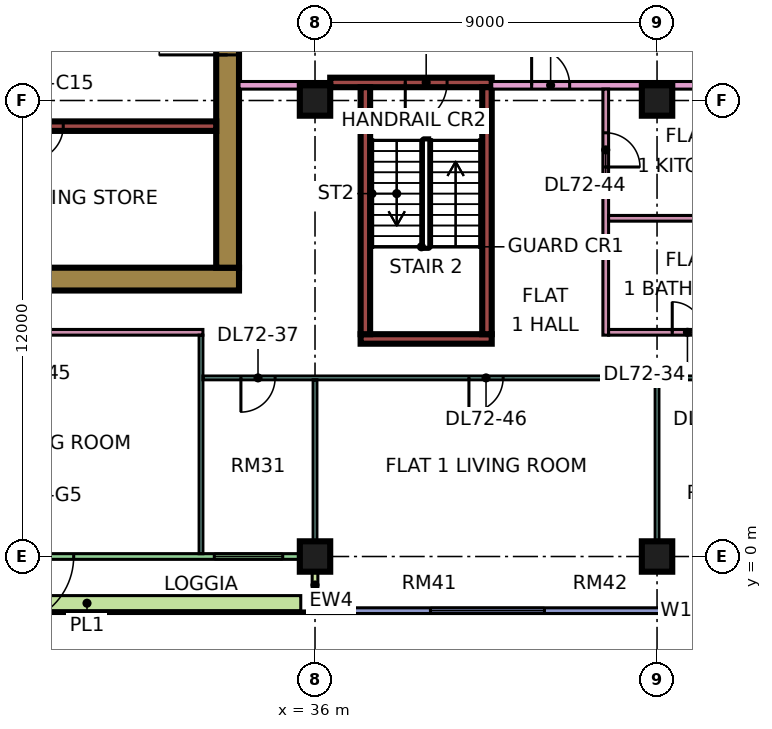
"""IFC4 building model, lengths in metres.
Left out: names, types, materials, properties, quantities, classifications, styles, units other than length and angle.
Written with IfcOpenShell. Run it as: python <this file> out.ifc"""

import sys

from ifc_helpers import new_model, si_unit, direction, frame, frame_2d, origin, origin_2d, place, context, subcontext, project, spatial, rectangle, extrude, element, fill, save


model = new_model("IFC4")
c1 = context("Model", 3, precision=1e-05, world=origin(), true_north=direction((0.0, 1.0)))
c2 = subcontext(c1, "Body", "Model", "MODEL_VIEW")
j1 = project(units=[si_unit("LENGTHUNIT", "METRE"), si_unit("PLANEANGLEUNIT", "RADIAN")], contexts=[c1])
p1 = place(None, origin())
s1 = spatial("IfcSite", under=j1, at=p1, CompositionType="ELEMENT")
p2 = place(p1, origin())
s2 = spatial("IfcBuilding", under=s1, at=p2, CompositionType="ELEMENT")
p3 = place(p2, frame((0.0, 0.0, 307.15)))
s3 = spatial("IfcBuildingStorey", under=s2, at=p3, CompositionType="ELEMENT", Elevation=307.15)
for number, where, z_axis, x_axis in (
    (1, (36.0, 0.0, 0.0), (0.0, 0.0, 1.0), (1.0, 0.0, 0.0)),
    (2, (36.0, 12.0, 0.0), (0.0, 0.0, 1.0), (1.0, 0.0, 0.0)),
    (3, (45.0, 0.0, 0.0), (0.0, 0.0, 1.0), (1.0, 0.0, 0.0)),
    (4, (45.0, 12.0, 0.0), (0.0, 0.0, 1.0), (1.0, 0.0, 0.0)),
):
    element("IfcColumn", number, at=place(p3, frame(where, z_axis=z_axis, x_axis=x_axis)), inside=s3, PredefinedType="COLUMN", context=c2, shape_type="SweptSolid", body=[
        extrude(rectangle(XDim=0.8, YDim=0.8, at=origin_2d()), origin(), (0.0, 0.0, 1.0), 3.75),
    ])
p4 = place(p3, frame((9.0, 7.3, 0.0), z_axis=(0.0, 0.0, 1.0), x_axis=(1.0, 0.0, 0.0)))
e5 = element("IfcWall", 5, at=p4, inside=s3, PredefinedType="SHEAR", context=c2, shape_type="SweptSolid", body=[
    extrude(rectangle(XDim=25.0, YDim=0.6, at=frame_2d((12.5, 0.0))), origin(), (0.0, 0.0, 1.0), 3.75),
])
p5 = place(p3, frame((33.7, 7.6, 0.0), z_axis=(0.0, 0.0, 1.0), x_axis=(0.0, 1.0, 0.0)))
e6 = element("IfcWall", 6, at=p5, inside=s3, PredefinedType="SHEAR", context=c2, shape_type="SweptSolid", body=[
    extrude(rectangle(XDim=11.8, YDim=0.6, at=frame_2d((5.9, 0.0))), origin(), (0.0, 0.0, 1.0), 3.75),
])
p6 = place(p5, frame((5.6, 0.0, 0.0)))
e7 = element("IfcOpeningElement", 7, at=p6, cuts=e6, PredefinedType="OPENING", context=c2, shape_type="SweptSolid", body=[
    extrude(rectangle(XDim=1.8, YDim=2.4, at=frame_2d((0.9, 1.2))), frame((0.0, 0.31, 0.0), z_axis=(0.0, -1.0, 0.0), x_axis=(1.0, 0.0, 0.0)), (0.0, 0.0, 1.0), 0.62),
])
p7 = place(p3, frame((13.45, 11.325, 0.0), z_axis=(0.0, 0.0, 1.0), x_axis=(1.0, 0.0, 0.0)))
e8 = element("IfcWall", 8, at=p7, inside=s3, PredefinedType="SHEAR", context=c2, shape_type="SweptSolid", body=[
    extrude(rectangle(XDim=19.95, YDim=0.25, at=frame_2d((9.975, 0.0))), origin(), (0.0, 0.0, 1.0), 3.75),
])
p8 = place(p7, frame((1.55, 0.0, 0.0)))
e9 = element("IfcOpeningElement", 9, at=p8, cuts=e8, PredefinedType="OPENING", context=c2, shape_type="SweptSolid", body=[
    extrude(rectangle(XDim=0.9, YDim=2.1, at=frame_2d((0.45, 1.05))), frame((0.0, 0.135, 0.0), z_axis=(0.0, -1.0, 0.0), x_axis=(1.0, 0.0, 0.0)), (0.0, 0.0, 1.0), 0.27),
])
p9 = place(p7, frame((5.05, 0.0, 0.0)))
e10 = element("IfcOpeningElement", 10, at=p9, cuts=e8, PredefinedType="OPENING", context=c2, shape_type="SweptSolid", body=[
    extrude(rectangle(XDim=0.9, YDim=2.1, at=frame_2d((0.45, 1.05))), frame((0.0, 0.135, 0.0), z_axis=(0.0, -1.0, 0.0), x_axis=(1.0, 0.0, 0.0)), (0.0, 0.0, 1.0), 0.27),
])
p10 = place(p7, frame((8.425, 0.0, 0.0)))
e11 = element("IfcOpeningElement", 11, at=p10, cuts=e8, PredefinedType="OPENING", context=c2, shape_type="SweptSolid", body=[
    extrude(rectangle(XDim=0.9, YDim=2.1, at=frame_2d((0.45, 1.05))), frame((0.0, 0.135, 0.0), z_axis=(0.0, -1.0, 0.0), x_axis=(1.0, 0.0, 0.0)), (0.0, 0.0, 1.0), 0.27),
])
p11 = place(p7, frame((15.025, 0.0, 0.0)))
e12 = element("IfcOpeningElement", 12, at=p11, cuts=e8, PredefinedType="OPENING", context=c2, shape_type="SweptSolid", body=[
    extrude(rectangle(XDim=0.9, YDim=2.1, at=frame_2d((0.45, 1.05))), frame((0.0, 0.135, 0.0), z_axis=(0.0, -1.0, 0.0), x_axis=(1.0, 0.0, 0.0)), (0.0, 0.0, 1.0), 0.27),
])
p12 = place(p3, frame((37.2, 5.725, 0.0), z_axis=(0.0, 0.0, 1.0), x_axis=(1.0, 0.0, 0.0)))
e13 = element("IfcWall", 13, at=p12, inside=s3, PredefinedType="SHEAR", context=c2, shape_type="SweptSolid", body=[
    extrude(rectangle(XDim=3.45, YDim=0.25, at=frame_2d((1.725, 0.0))), origin(), (0.0, 0.0, 1.0), 3.75),
])
p13 = place(p3, frame((36.4, 12.475, 0.0), z_axis=(0.0, 0.0, 1.0), x_axis=(1.0, 0.0, 0.0)))
e14 = element("IfcWall", 14, at=p13, inside=s3, PredefinedType="SHEAR", context=c2, shape_type="SweptSolid", body=[
    extrude(rectangle(XDim=4.25, YDim=0.25, at=frame_2d((2.125, 0.0))), origin(), (0.0, 0.0, 1.0), 3.75),
])
p14 = place(p13, frame((1.975, 0.0, 0.0)))
e15 = element("IfcOpeningElement", 15, at=p14, cuts=e14, PredefinedType="OPENING", context=c2, shape_type="SweptSolid", body=[
    extrude(rectangle(XDim=1.1, YDim=2.2, at=frame_2d((0.55, 1.1))), frame((0.0, 0.135, 0.0), z_axis=(0.0, -1.0, 0.0), x_axis=(1.0, 0.0, 0.0)), (0.0, 0.0, 1.0), 0.27),
])
for number, where, z_axis, x_axis in (
    (16, (37.325, 5.85, 0.0), (0.0, 0.0, 1.0), (0.0, 1.0, 0.0)),
    (17, (40.525, 5.85, 0.0), (0.0, 0.0, 1.0), (0.0, 1.0, 0.0)),
):
    element("IfcWall", number, at=place(p3, frame(where, z_axis=z_axis, x_axis=x_axis)), inside=s3, PredefinedType="SHEAR", context=c2, shape_type="SweptSolid", body=[
        extrude(rectangle(XDim=6.5, YDim=0.25, at=frame_2d((3.25, 0.0))), origin(), (0.0, 0.0, 1.0), 3.75),
    ])
p15 = place(p3, frame((24.075, 0.0, 0.0), z_axis=(0.0, 0.0, 1.0), x_axis=(1.0, 0.0, 0.0)))
e18 = element("IfcWall", 18, at=p15, inside=s3, PredefinedType="SOLIDWALL", context=c2, shape_type="SweptSolid", body=[
    extrude(rectangle(XDim=11.85, YDim=0.15, at=frame_2d((5.925, 0.0))), origin(), (0.0, 0.0, 1.0), 3.35),
])
p16 = place(p15, frame((3.775, 0.0, 0.0)))
e19 = element("IfcOpeningElement", 19, at=p16, cuts=e18, PredefinedType="OPENING", context=c2, shape_type="SweptSolid", body=[
    extrude(rectangle(XDim=1.8, YDim=2.4, at=frame_2d((0.9, 1.2))), frame((0.0, 0.085, 0.0), z_axis=(0.0, -1.0, 0.0), x_axis=(1.0, 0.0, 0.0)), (0.0, 0.0, 1.0), 0.17),
])
p17 = place(p15, frame((9.275, 0.0, 0.45)))
e20 = element("IfcOpeningElement", 20, at=p17, cuts=e18, PredefinedType="OPENING", context=c2, shape_type="SweptSolid", body=[
    extrude(rectangle(XDim=1.8, YDim=2.4, at=frame_2d((0.9, 1.2))), frame((0.0, 0.085, 0.0), z_axis=(0.0, -1.0, 0.0), x_axis=(1.0, 0.0, 0.0)), (0.0, 0.0, 1.0), 0.17),
])
p18 = place(p3, frame((36.0, -1.5, 0.0), z_axis=(0.0, 0.0, 1.0), x_axis=(0.0, 1.0, 0.0)))
e21 = element("IfcWall", 21, at=p18, inside=s3, PredefinedType="SOLIDWALL", context=c2, shape_type="SweptSolid", body=[
    extrude(rectangle(XDim=1.5, YDim=0.15, at=frame_2d((0.75, 0.0))), origin(), (0.0, 0.0, 1.0), 3.35),
])
p19 = place(p3, frame((36.075, -1.425, 0.0), z_axis=(0.0, 0.0, 1.0), x_axis=(1.0, 0.0, 0.0)))
e22 = element("IfcWall", 22, at=p19, inside=s3, PredefinedType="SOLIDWALL", context=c2, shape_type="SweptSolid", body=[
    extrude(rectangle(XDim=11.85, YDim=0.15, at=frame_2d((5.925, 0.0))), origin(), (0.0, 0.0, 1.0), 3.35),
])
p20 = place(p19, frame((2.962, 0.0, 0.45)))
e23 = element("IfcOpeningElement", 23, at=p20, cuts=e22, PredefinedType="OPENING", context=c2, shape_type="SweptSolid", body=[
    extrude(rectangle(XDim=3.0, YDim=2.4, at=frame_2d((1.5, 1.2))), frame((0.0, 0.085, 0.0), z_axis=(0.0, -1.0, 0.0), x_axis=(1.0, 0.0, 0.0)), (0.0, 0.0, 1.0), 0.17),
])
p21 = place(p19, frame((9.488, 0.0, 0.45)))
e24 = element("IfcOpeningElement", 24, at=p21, cuts=e22, PredefinedType="OPENING", context=c2, shape_type="SweptSolid", body=[
    extrude(rectangle(XDim=1.8, YDim=2.4, at=frame_2d((0.9, 1.2))), frame((0.0, 0.085, 0.0), z_axis=(0.0, -1.0, 0.0), x_axis=(1.0, 0.0, 0.0)), (0.0, 0.0, 1.0), 0.17),
])
p22 = place(p3, frame((24.375, -1.229, 0.0), z_axis=(0.0, 0.0, 1.0), x_axis=(1.0, 0.0, 0.0)))
e25 = element("IfcWall", 25, at=p22, inside=s3, PredefinedType="SOLIDWALL", context=c2, shape_type="SweptSolid", body=[
    extrude(rectangle(XDim=11.25, YDim=0.4, at=frame_2d((5.625, 0.0))), origin(), (0.0, 0.0, 1.0), 0.7),
])
p23 = place(p3, frame((11.925, 5.9, 0.0), z_axis=(0.0, 0.0, 1.0), x_axis=(1.0, 0.0, 0.0)))
e26 = element("IfcWall", 26, at=p23, inside=s3, PredefinedType="PARTITIONING", context=c2, shape_type="SweptSolid", body=[
    extrude(rectangle(XDim=21.125, YDim=0.15, at=frame_2d((10.562, 0.0))), origin(), (0.0, 0.0, 1.0), 3.35),
])
p24 = place(p23, frame((7.125, 0.0, 0.0)))
e27 = element("IfcOpeningElement", 27, at=p24, cuts=e26, PredefinedType="OPENING", context=c2, shape_type="SweptSolid", body=[
    extrude(rectangle(XDim=0.9, YDim=2.1, at=frame_2d((0.45, 1.05))), frame((0.0, 0.085, 0.0), z_axis=(0.0, -1.0, 0.0), x_axis=(1.0, 0.0, 0.0)), (0.0, 0.0, 1.0), 0.17),
])
p25 = place(p23, frame((10.125, 0.0, 0.0)))
e28 = element("IfcOpeningElement", 28, at=p25, cuts=e26, PredefinedType="OPENING", context=c2, shape_type="SweptSolid", body=[
    extrude(rectangle(XDim=0.9, YDim=2.1, at=frame_2d((0.45, 1.05))), frame((0.0, 0.085, 0.0), z_axis=(0.0, -1.0, 0.0), x_axis=(1.0, 0.0, 0.0)), (0.0, 0.0, 1.0), 0.17),
])
p26 = place(p23, frame((4.125, 0.0, 0.0)))
e29 = element("IfcOpeningElement", 29, at=p26, cuts=e26, PredefinedType="OPENING", context=c2, shape_type="SweptSolid", body=[
    extrude(rectangle(XDim=0.9, YDim=2.1, at=frame_2d((0.45, 1.05))), frame((0.0, 0.085, 0.0), z_axis=(0.0, -1.0, 0.0), x_axis=(1.0, 0.0, 0.0)), (0.0, 0.0, 1.0), 0.17),
])
p27 = place(p23, frame((16.125, 0.0, 0.0)))
e30 = element("IfcOpeningElement", 30, at=p27, cuts=e26, PredefinedType="OPENING", context=c2, shape_type="SweptSolid", body=[
    extrude(rectangle(XDim=0.9, YDim=2.1, at=frame_2d((0.45, 1.05))), frame((0.0, 0.085, 0.0), z_axis=(0.0, -1.0, 0.0), x_axis=(1.0, 0.0, 0.0)), (0.0, 0.0, 1.0), 0.17),
])
p28 = place(p3, frame((33.0, 0.074, 0.0), z_axis=(0.0, 0.0, 1.0), x_axis=(0.0, 1.0, 0.0)))
e31 = element("IfcWall", 31, at=p28, inside=s3, PredefinedType="PARTITIONING", context=c2, shape_type="SweptSolid", body=[
    extrude(rectangle(XDim=5.751, YDim=0.1, at=frame_2d((2.875, 0.0))), origin(), (0.0, 0.0, 1.0), 3.35),
])
p29 = place(p3, frame((33.05, 4.7, 0.0), z_axis=(0.0, 0.0, 1.0), x_axis=(1.0, 0.0, 0.0)))
e32 = element("IfcWall", 32, at=p29, inside=s3, PredefinedType="PARTITIONING", context=c2, shape_type="SweptSolid", body=[
    extrude(rectangle(XDim=14.85, YDim=0.1, at=frame_2d((7.425, 0.0))), origin(), (0.0, 0.0, 1.0), 3.35),
])
p30 = place(p29, frame((1.0, 0.0, 0.0)))
e33 = element("IfcOpeningElement", 33, at=p30, cuts=e32, PredefinedType="OPENING", context=c2, shape_type="SweptSolid", body=[
    extrude(rectangle(XDim=0.9, YDim=2.1, at=frame_2d((0.45, 1.05))), frame((0.0, 0.06, 0.0), z_axis=(0.0, -1.0, 0.0), x_axis=(1.0, 0.0, 0.0)), (0.0, 0.0, 1.0), 0.12),
])
p31 = place(p29, frame((13.0, 0.0, 0.0)))
e34 = element("IfcOpeningElement", 34, at=p31, cuts=e32, PredefinedType="OPENING", context=c2, shape_type="SweptSolid", body=[
    extrude(rectangle(XDim=0.9, YDim=2.1, at=frame_2d((0.45, 1.05))), frame((0.0, 0.06, 0.0), z_axis=(0.0, -1.0, 0.0), x_axis=(1.0, 0.0, 0.0)), (0.0, 0.0, 1.0), 0.12),
])
p32 = place(p29, frame((7.0, 0.0, 0.0)))
e35 = element("IfcOpeningElement", 35, at=p32, cuts=e32, PredefinedType="OPENING", context=c2, shape_type="SweptSolid", body=[
    extrude(rectangle(XDim=0.9, YDim=2.1, at=frame_2d((0.45, 1.05))), frame((0.0, 0.06, 0.0), z_axis=(0.0, -1.0, 0.0), x_axis=(1.0, 0.0, 0.0)), (0.0, 0.0, 1.0), 0.12),
])
p33 = place(p3, frame((34.0, 12.4, 0.0), z_axis=(0.0, 0.0, 1.0), x_axis=(1.0, 0.0, 0.0)))
e36 = element("IfcWall", 36, at=p33, inside=s3, PredefinedType="PARTITIONING", context=c2, shape_type="SweptSolid", body=[
    extrude(rectangle(XDim=2.401, YDim=0.2, at=frame_2d((1.2, 0.0))), origin(), (0.0, 0.0, 1.0), 3.35),
])
p34 = place(p3, frame((36.0, 0.0, 0.0), z_axis=(0.0, 0.0, 1.0), x_axis=(0.0, 1.0, 0.0)))
e37 = element("IfcWall", 37, at=p34, inside=s3, PredefinedType="PARTITIONING", context=c2, shape_type="SweptSolid", body=[
    extrude(rectangle(XDim=4.65, YDim=0.1, at=frame_2d((2.325, 0.0))), origin(), (0.0, 0.0, 1.0), 3.35),
])
p35 = place(p3, frame((40.65, 12.4, 0.0), z_axis=(0.0, 0.0, 1.0), x_axis=(1.0, 0.0, 0.0)))
e38 = element("IfcWall", 38, at=p35, inside=s3, PredefinedType="PARTITIONING", context=c2, shape_type="SweptSolid", body=[
    extrude(rectangle(XDim=22.35, YDim=0.2, at=frame_2d((11.175, 0.0))), origin(), (0.0, 0.0, 1.0), 3.35),
])
p36 = place(p35, frame((20.7, 0.0, 0.0)))
e39 = element("IfcOpeningElement", 39, at=p36, cuts=e38, PredefinedType="OPENING", context=c2, shape_type="SweptSolid", body=[
    extrude(rectangle(XDim=1.0, YDim=2.1, at=frame_2d((0.5, 1.05))), frame((0.0, 0.11, 0.0), z_axis=(0.0, -1.0, 0.0), x_axis=(1.0, 0.0, 0.0)), (0.0, 0.0, 1.0), 0.22),
])
p37 = place(p35, frame((1.05, 0.0, 0.0)))
e40 = element("IfcOpeningElement", 40, at=p37, cuts=e38, PredefinedType="OPENING", context=c2, shape_type="SweptSolid", body=[
    extrude(rectangle(XDim=1.0, YDim=2.1, at=frame_2d((0.5, 1.05))), frame((0.0, 0.11, 0.0), z_axis=(0.0, -1.0, 0.0), x_axis=(1.0, 0.0, 0.0)), (0.0, 0.0, 1.0), 0.22),
])
p38 = place(p3, frame((43.65, 5.825, 0.0), z_axis=(0.0, 0.0, 1.0), x_axis=(0.0, 1.0, 0.0)))
e41 = element("IfcWall", 41, at=p38, inside=s3, PredefinedType="PARTITIONING", context=c2, shape_type="SweptSolid", body=[
    extrude(rectangle(XDim=6.475, YDim=0.15, at=frame_2d((3.238, 0.0))), origin(), (0.0, 0.0, 1.0), 3.35),
])
p39 = place(p38, frame((4.425, 0.0, 0.0)))
e42 = element("IfcOpeningElement", 42, at=p39, cuts=e41, PredefinedType="OPENING", context=c2, shape_type="SweptSolid", body=[
    extrude(rectangle(XDim=0.9, YDim=2.1, at=frame_2d((0.45, 1.05))), frame((0.0, 0.085, 0.0), z_axis=(0.0, -1.0, 0.0), x_axis=(1.0, 0.0, 0.0)), (0.0, 0.0, 1.0), 0.17),
])
p40 = place(p3, frame((43.725, 5.9, 0.0), z_axis=(0.0, 0.0, 1.0), x_axis=(1.0, 0.0, 0.0)))
e43 = element("IfcWall", 43, at=p40, inside=s3, PredefinedType="PARTITIONING", context=c2, shape_type="SweptSolid", body=[
    extrude(rectangle(XDim=4.175, YDim=0.15, at=frame_2d((2.087, 0.0))), origin(), (0.0, 0.0, 1.0), 3.35),
])
p41 = place(p40, frame((1.675, 0.0, 0.0)))
e44 = element("IfcOpeningElement", 44, at=p41, cuts=e43, PredefinedType="OPENING", context=c2, shape_type="SweptSolid", body=[
    extrude(rectangle(XDim=0.8, YDim=2.1, at=frame_2d((0.4, 1.05))), frame((0.0, 0.085, 0.0), z_axis=(0.0, -1.0, 0.0), x_axis=(1.0, 0.0, 0.0)), (0.0, 0.0, 1.0), 0.17),
])
p42 = place(p3, frame((43.725, 8.9, 0.0), z_axis=(0.0, 0.0, 1.0), x_axis=(1.0, 0.0, 0.0)))
e45 = element("IfcWall", 45, at=p42, inside=s3, PredefinedType="PARTITIONING", context=c2, shape_type="SweptSolid", body=[
    extrude(rectangle(XDim=4.175, YDim=0.15, at=frame_2d((2.087, 0.0))), origin(), (0.0, 0.0, 1.0), 3.35),
])
p43 = place(p3, frame((45.0, 0.0, 0.0), z_axis=(0.0, 0.0, 1.0), x_axis=(0.0, 1.0, 0.0)))
e46 = element("IfcWall", 46, at=p43, inside=s3, PredefinedType="PARTITIONING", context=c2, shape_type="SweptSolid", body=[
    extrude(rectangle(XDim=4.65, YDim=0.1, at=frame_2d((2.325, 0.0))), origin(), (0.0, 0.0, 1.0), 3.35),
])
p44 = place(p16, frame((1.8, 0.0, 0.0), z_axis=(0.0, 0.0, 1.0), x_axis=(-1.0, 0.0, 0.0)))
e47 = element("IfcDoor", 47, at=p44, inside=s3, OperationType="DOUBLE_DOOR_SINGLE_SWING", PredefinedType="DOOR", context=c2, shape_type="SweptSolid", body=[
    extrude(rectangle(XDim=1.8, YDim=2.4, at=frame_2d((0.9, 1.2))), frame((0.0, 0.025, 0.0), z_axis=(0.0, -1.0, 0.0), x_axis=(1.0, 0.0, 0.0)), (0.0, 0.0, 1.0), 0.05),
])
fill(e19, e47)
p45 = place(p17, origin())
e48 = element("IfcWindow", 48, at=p45, inside=s3, PartitioningType="SINGLE_PANEL", PredefinedType="WINDOW", context=c2, shape_type="SweptSolid", body=[
    extrude(rectangle(XDim=1.8, YDim=2.4, at=frame_2d((0.9, 1.2))), frame((0.0, 0.03, 0.0), z_axis=(0.0, -1.0, 0.0), x_axis=(1.0, 0.0, 0.0)), (0.0, 0.0, 1.0), 0.06),
])
fill(e20, e48)
p46 = place(p20, origin())
e49 = element("IfcWindow", 49, at=p46, inside=s3, PartitioningType="SINGLE_PANEL", PredefinedType="WINDOW", context=c2, shape_type="SweptSolid", body=[
    extrude(rectangle(XDim=3.0, YDim=2.4, at=frame_2d((1.5, 1.2))), frame((0.0, 0.03, 0.0), z_axis=(0.0, -1.0, 0.0), x_axis=(1.0, 0.0, 0.0)), (0.0, 0.0, 1.0), 0.06),
])
fill(e23, e49)
p47 = place(p21, origin())
e50 = element("IfcWindow", 50, at=p47, inside=s3, PartitioningType="SINGLE_PANEL", PredefinedType="WINDOW", context=c2, shape_type="SweptSolid", body=[
    extrude(rectangle(XDim=1.8, YDim=2.4, at=frame_2d((0.9, 1.2))), frame((0.0, 0.03, 0.0), z_axis=(0.0, -1.0, 0.0), x_axis=(1.0, 0.0, 0.0)), (0.0, 0.0, 1.0), 0.06),
])
fill(e24, e50)
p48 = place(p6, origin())
e51 = element("IfcDoor", 51, at=p48, inside=s3, OperationType="DOUBLE_DOOR_SINGLE_SWING", PredefinedType="DOOR", context=c2, shape_type="SweptSolid", body=[
    extrude(rectangle(XDim=1.8, YDim=2.4, at=frame_2d((0.9, 1.2))), frame((0.0, 0.025, 0.0), z_axis=(0.0, -1.0, 0.0), x_axis=(1.0, 0.0, 0.0)), (0.0, 0.0, 1.0), 0.05),
])
fill(e7, e51)
p49 = place(p14, frame((1.1, 0.0, 0.0), z_axis=(0.0, 0.0, 1.0), x_axis=(-1.0, 0.0, 0.0)))
e52 = element("IfcDoor", 52, at=p49, inside=s3, OperationType="SINGLE_SWING_LEFT", PredefinedType="DOOR", context=c2, shape_type="SweptSolid", body=[
    extrude(rectangle(XDim=1.1, YDim=2.2, at=frame_2d((0.55, 1.1))), frame((0.0, 0.025, 0.0), z_axis=(0.0, -1.0, 0.0), x_axis=(1.0, 0.0, 0.0)), (0.0, 0.0, 1.0), 0.05),
])
fill(e15, e52)
p50 = place(p11, frame((0.9, 0.0, 0.0), z_axis=(0.0, 0.0, 1.0), x_axis=(-1.0, 0.0, 0.0)))
e53 = element("IfcDoor", 53, at=p50, inside=s3, OperationType="SINGLE_SWING_LEFT", PredefinedType="DOOR", context=c2, shape_type="SweptSolid", body=[
    extrude(rectangle(XDim=0.9, YDim=2.1, at=frame_2d((0.45, 1.05))), frame((0.0, 0.025, 0.0), z_axis=(0.0, -1.0, 0.0), x_axis=(1.0, 0.0, 0.0)), (0.0, 0.0, 1.0), 0.05),
])
fill(e12, e53)
p51 = place(p41, origin())
e54 = element("IfcDoor", 54, at=p51, inside=s3, OperationType="SINGLE_SWING_LEFT", PredefinedType="DOOR", context=c2, shape_type="SweptSolid", body=[
    extrude(rectangle(XDim=0.8, YDim=2.1, at=frame_2d((0.4, 1.05))), frame((0.0, 0.025, 0.0), z_axis=(0.0, -1.0, 0.0), x_axis=(1.0, 0.0, 0.0)), (0.0, 0.0, 1.0), 0.05),
])
fill(e44, e54)
p52 = place(p30, frame((0.9, 0.0, 0.0), z_axis=(0.0, 0.0, 1.0), x_axis=(-1.0, 0.0, 0.0)))
e55 = element("IfcDoor", 55, at=p52, inside=s3, OperationType="SINGLE_SWING_LEFT", PredefinedType="DOOR", context=c2, shape_type="SweptSolid", body=[
    extrude(rectangle(XDim=0.9, YDim=2.1, at=frame_2d((0.45, 1.05))), frame((0.0, 0.025, 0.0), z_axis=(0.0, -1.0, 0.0), x_axis=(1.0, 0.0, 0.0)), (0.0, 0.0, 1.0), 0.05),
])
fill(e33, e55)
p53 = place(p37, origin())
e56 = element("IfcDoor", 56, at=p53, inside=s3, OperationType="SINGLE_SWING_LEFT", PredefinedType="DOOR", context=c2, shape_type="SweptSolid", body=[
    extrude(rectangle(XDim=1.0, YDim=2.1, at=frame_2d((0.5, 1.05))), frame((0.0, 0.025, 0.0), z_axis=(0.0, -1.0, 0.0), x_axis=(1.0, 0.0, 0.0)), (0.0, 0.0, 1.0), 0.05),
])
fill(e40, e56)
p54 = place(p39, frame((0.9, 0.0, 0.0), z_axis=(0.0, 0.0, 1.0), x_axis=(-1.0, 0.0, 0.0)))
e57 = element("IfcDoor", 57, at=p54, inside=s3, OperationType="SINGLE_SWING_LEFT", PredefinedType="DOOR", context=c2, shape_type="SweptSolid", body=[
    extrude(rectangle(XDim=0.9, YDim=2.1, at=frame_2d((0.45, 1.05))), frame((0.0, 0.025, 0.0), z_axis=(0.0, -1.0, 0.0), x_axis=(1.0, 0.0, 0.0)), (0.0, 0.0, 1.0), 0.05),
])
fill(e42, e57)
p55 = place(p32, frame((0.9, 0.0, 0.0), z_axis=(0.0, 0.0, 1.0), x_axis=(-1.0, 0.0, 0.0)))
e58 = element("IfcDoor", 58, at=p55, inside=s3, OperationType="SINGLE_SWING_LEFT", PredefinedType="DOOR", context=c2, shape_type="SweptSolid", body=[
    extrude(rectangle(XDim=0.9, YDim=2.1, at=frame_2d((0.45, 1.05))), frame((0.0, 0.025, 0.0), z_axis=(0.0, -1.0, 0.0), x_axis=(1.0, 0.0, 0.0)), (0.0, 0.0, 1.0), 0.05),
])
fill(e35, e58)
save(model, sys.argv[1])
